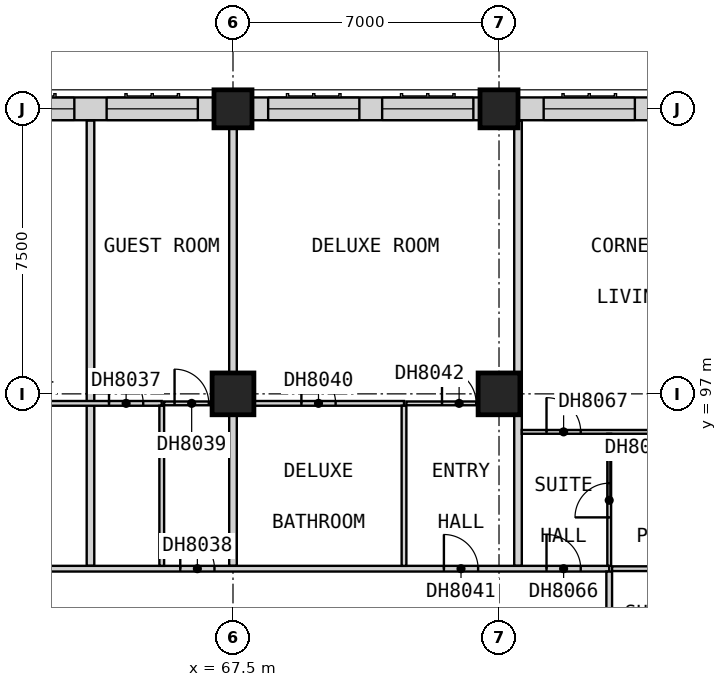
"""IFC4 building model, lengths in metres.
Left out: names, types, materials, properties, quantities, classifications, styles, units other than length and angle.
Written with IfcOpenShell. Run it as: python <this file> out.ifc"""

import sys

from ifc_helpers import new_model, si_unit, direction, frame, frame_2d, origin, origin_2d, place, context, subcontext, project, spatial, rectangle, extrude, element, fill, save


model = new_model("IFC4")
c1 = context("Model", 3, precision=1e-05, world=origin(), true_north=direction((0.0, 1.0)))
c2 = subcontext(c1, "Body", "Model", "MODEL_VIEW")
j1 = project(units=[si_unit("LENGTHUNIT", "METRE"), si_unit("PLANEANGLEUNIT", "RADIAN")], contexts=[c1])
p1 = place(None, origin())
s1 = spatial("IfcSite", under=j1, at=p1, CompositionType="ELEMENT")
p2 = place(p1, origin())
s2 = spatial("IfcBuilding", under=s1, at=p2, CompositionType="ELEMENT")
p3 = place(p2, frame((0.0, 0.0, 89.9)))
s3 = spatial("IfcBuildingStorey", under=s2, at=p3, CompositionType="ELEMENT", Elevation=89.9)
p4 = place(p3, frame((67.5, 97.0, 0.0), z_axis=(0.0, 0.0, 1.0), x_axis=(1.0, 0.0, 0.0)))
e1 = element("IfcColumn", 1, at=p4, inside=s3, PredefinedType="COLUMN", context=c2, shape_type="SweptSolid", body=[
    extrude(rectangle(XDim=1.1, YDim=1.1, at=origin_2d()), origin(), (0.0, 0.0, 1.0), 3.6),
])
p5 = place(p3, frame((67.5, 104.5, 0.0), z_axis=(0.0, 0.0, 1.0), x_axis=(1.0, 0.0, 0.0)))
e2 = element("IfcColumn", 2, at=p5, inside=s3, PredefinedType="COLUMN", context=c2, shape_type="SweptSolid", body=[
    extrude(rectangle(XDim=1.0, YDim=1.0, at=origin_2d()), origin(), (0.0, 0.0, 1.0), 3.6),
])
p6 = place(p3, frame((74.5, 97.0, 0.0), z_axis=(0.0, 0.0, 1.0), x_axis=(1.0, 0.0, 0.0)))
e3 = element("IfcColumn", 3, at=p6, inside=s3, PredefinedType="COLUMN", context=c2, shape_type="SweptSolid", body=[
    extrude(rectangle(XDim=1.1, YDim=1.1, at=origin_2d()), origin(), (0.0, 0.0, 1.0), 3.6),
])
p7 = place(p3, frame((74.5, 104.5, 0.0), z_axis=(0.0, 0.0, 1.0), x_axis=(1.0, 0.0, 0.0)))
e4 = element("IfcColumn", 4, at=p7, inside=s3, PredefinedType="COLUMN", context=c2, shape_type="SweptSolid", body=[
    extrude(rectangle(XDim=1.0, YDim=1.0, at=origin_2d()), origin(), (0.0, 0.0, 1.0), 3.6),
])
p8 = place(p3, frame((81.5, 104.5, 0.0), z_axis=(0.0, 0.0, 1.0), x_axis=(-1.0, 0.0, 0.0)))
e5 = element("IfcWall", 5, at=p8, inside=s3, PredefinedType="SOLIDWALL", context=c2, shape_type="SweptSolid", body=[
    extrude(rectangle(XDim=6.5, YDim=0.6, at=frame_2d((3.25, 0.0))), origin(), (0.0, 0.0, 1.0), 2.85),
])
p9 = place(p8, frame((3.425, 0.0, 0.8)))
e6 = element("IfcOpeningElement", 6, at=p9, cuts=e5, PredefinedType="OPENING", context=c2, shape_type="SweptSolid", body=[
    extrude(rectangle(XDim=2.4, YDim=1.8, at=frame_2d((1.2, 0.9))), frame((0.0, 0.31, 0.0), z_axis=(0.0, -1.0, 0.0), x_axis=(1.0, 0.0, 0.0)), (0.0, 0.0, 1.0), 0.62),
])
p10 = place(p8, frame((0.175, 0.0, 0.8)))
e7 = element("IfcOpeningElement", 7, at=p10, cuts=e5, PredefinedType="OPENING", context=c2, shape_type="SweptSolid", body=[
    extrude(rectangle(XDim=2.4, YDim=1.8, at=frame_2d((1.2, 0.9))), frame((0.0, 0.31, 0.0), z_axis=(0.0, -1.0, 0.0), x_axis=(1.0, 0.0, 0.0)), (0.0, 0.0, 1.0), 0.62),
])
p11 = place(p3, frame((74.0, 104.5, 0.0), z_axis=(0.0, 0.0, 1.0), x_axis=(-1.0, 0.0, 0.0)))
e8 = element("IfcWall", 8, at=p11, inside=s3, PredefinedType="SOLIDWALL", context=c2, shape_type="SweptSolid", body=[
    extrude(rectangle(XDim=6.0, YDim=0.6, at=frame_2d((3.0, 0.0))), origin(), (0.0, 0.0, 1.0), 2.85),
])
p12 = place(p11, frame((3.175, 0.0, 0.8)))
e9 = element("IfcOpeningElement", 9, at=p12, cuts=e8, PredefinedType="OPENING", context=c2, shape_type="SweptSolid", body=[
    extrude(rectangle(XDim=2.4, YDim=1.8, at=frame_2d((1.2, 0.9))), frame((0.0, 0.31, 0.0), z_axis=(0.0, -1.0, 0.0), x_axis=(1.0, 0.0, 0.0)), (0.0, 0.0, 1.0), 0.62),
])
p13 = place(p11, frame((0.175, 0.0, 0.8)))
e10 = element("IfcOpeningElement", 10, at=p13, cuts=e8, PredefinedType="OPENING", context=c2, shape_type="SweptSolid", body=[
    extrude(rectangle(XDim=2.4, YDim=1.8, at=frame_2d((1.2, 0.9))), frame((0.0, 0.31, 0.0), z_axis=(0.0, -1.0, 0.0), x_axis=(1.0, 0.0, 0.0)), (0.0, 0.0, 1.0), 0.62),
])
p14 = place(p3, frame((67.0, 104.5, 0.0), z_axis=(0.0, 0.0, 1.0), x_axis=(-1.0, 0.0, 0.0)))
e11 = element("IfcWall", 11, at=p14, inside=s3, PredefinedType="SOLIDWALL", context=c2, shape_type="SweptSolid", body=[
    extrude(rectangle(XDim=6.5, YDim=0.6, at=frame_2d((3.25, 0.0))), origin(), (0.0, 0.0, 1.0), 2.85),
])
p15 = place(p14, frame((3.675, 0.0, 0.8)))
e12 = element("IfcOpeningElement", 12, at=p15, cuts=e11, PredefinedType="OPENING", context=c2, shape_type="SweptSolid", body=[
    extrude(rectangle(XDim=2.4, YDim=1.8, at=frame_2d((1.2, 0.9))), frame((0.0, 0.31, 0.0), z_axis=(0.0, -1.0, 0.0), x_axis=(1.0, 0.0, 0.0)), (0.0, 0.0, 1.0), 0.62),
])
p16 = place(p14, frame((0.425, 0.0, 0.8)))
e13 = element("IfcOpeningElement", 13, at=p16, cuts=e11, PredefinedType="OPENING", context=c2, shape_type="SweptSolid", body=[
    extrude(rectangle(XDim=2.4, YDim=1.8, at=frame_2d((1.2, 0.9))), frame((0.0, 0.31, 0.0), z_axis=(0.0, -1.0, 0.0), x_axis=(1.0, 0.0, 0.0)), (0.0, 0.0, 1.0), 0.62),
])
p17 = place(p3, frame((63.75, 92.475, 0.0), z_axis=(0.0, 0.0, 1.0), x_axis=(0.0, 1.0, 0.0)))
e14 = element("IfcWall", 14, at=p17, inside=s3, PredefinedType="PARTITIONING", context=c2, shape_type="SweptSolid", body=[
    extrude(rectangle(XDim=11.715, YDim=0.2, at=frame_2d((5.857, 0.0))), origin(), (0.0, 0.0, 1.0), 3.35),
])
p18 = place(p3, frame((67.5, 92.475, 0.0), z_axis=(0.0, 0.0, 1.0), x_axis=(0.0, 1.0, 0.0)))
e15 = element("IfcWall", 15, at=p18, inside=s3, PredefinedType="PARTITIONING", context=c2, shape_type="SweptSolid", body=[
    extrude(rectangle(XDim=12.525, YDim=0.2, at=frame_2d((6.262, 0.0))), origin(), (0.0, 0.0, 1.0), 3.35),
])
p19 = place(p3, frame((75.0, 92.475, 0.0), z_axis=(0.0, 0.0, 1.0), x_axis=(0.0, 1.0, 0.0)))
e16 = element("IfcWall", 16, at=p19, inside=s3, PredefinedType="PARTITIONING", context=c2, shape_type="SweptSolid", body=[
    extrude(rectangle(XDim=11.715, YDim=0.2, at=frame_2d((5.857, 0.0))), origin(), (0.0, 0.0, 1.0), 3.35),
])
p20 = place(p3, frame((33.75, 92.4, 0.0), z_axis=(0.0, 0.0, 1.0), x_axis=(1.0, 0.0, 0.0)))
e17 = element("IfcWall", 17, at=p20, inside=s3, PredefinedType="PARTITIONING", context=c2, shape_type="SweptSolid", body=[
    extrude(rectangle(XDim=43.65, YDim=0.15, at=frame_2d((21.825, 0.0))), origin(), (0.0, 0.0, 1.0), 3.35),
])
p21 = place(p20, frame((5.175, 0.0, 0.0)))
e18 = element("IfcOpeningElement", 18, at=p21, cuts=e17, PredefinedType="OPENING", context=c2, shape_type="SweptSolid", body=[
    extrude(rectangle(XDim=0.9, YDim=2.1, at=frame_2d((0.45, 1.05))), frame((0.0, 0.085, 0.0), z_axis=(0.0, -1.0, 0.0), x_axis=(1.0, 0.0, 0.0)), (0.0, 0.0, 1.0), 0.17),
])
p22 = place(p20, frame((13.05, 0.0, 0.0)))
e19 = element("IfcOpeningElement", 19, at=p22, cuts=e17, PredefinedType="OPENING", context=c2, shape_type="SweptSolid", body=[
    extrude(rectangle(XDim=0.9, YDim=2.1, at=frame_2d((0.45, 1.05))), frame((0.0, 0.085, 0.0), z_axis=(0.0, -1.0, 0.0), x_axis=(1.0, 0.0, 0.0)), (0.0, 0.0, 1.0), 0.17),
])
p23 = place(p20, frame((20.55, 0.0, 0.0)))
e20 = element("IfcOpeningElement", 20, at=p23, cuts=e17, PredefinedType="OPENING", context=c2, shape_type="SweptSolid", body=[
    extrude(rectangle(XDim=0.9, YDim=2.1, at=frame_2d((0.45, 1.05))), frame((0.0, 0.085, 0.0), z_axis=(0.0, -1.0, 0.0), x_axis=(1.0, 0.0, 0.0)), (0.0, 0.0, 1.0), 0.17),
])
p24 = place(p20, frame((32.363, 0.0, 0.0)))
e21 = element("IfcOpeningElement", 21, at=p24, cuts=e17, PredefinedType="OPENING", context=c2, shape_type="SweptSolid", body=[
    extrude(rectangle(XDim=0.9, YDim=2.1, at=frame_2d((0.45, 1.05))), frame((0.0, 0.085, 0.0), z_axis=(0.0, -1.0, 0.0), x_axis=(1.0, 0.0, 0.0)), (0.0, 0.0, 1.0), 0.17),
])
p25 = place(p20, frame((39.3, 0.0, 0.0)))
e22 = element("IfcOpeningElement", 22, at=p25, cuts=e17, PredefinedType="OPENING", context=c2, shape_type="SweptSolid", body=[
    extrude(rectangle(XDim=0.9, YDim=2.1, at=frame_2d((0.45, 1.05))), frame((0.0, 0.085, 0.0), z_axis=(0.0, -1.0, 0.0), x_axis=(1.0, 0.0, 0.0)), (0.0, 0.0, 1.0), 0.17),
])
p26 = place(p20, frame((42.0, 0.0, 0.0)))
e23 = element("IfcOpeningElement", 23, at=p26, cuts=e17, PredefinedType="OPENING", context=c2, shape_type="SweptSolid", body=[
    extrude(rectangle(XDim=0.9, YDim=2.1, at=frame_2d((0.45, 1.05))), frame((0.0, 0.085, 0.0), z_axis=(0.0, -1.0, 0.0), x_axis=(1.0, 0.0, 0.0)), (0.0, 0.0, 1.0), 0.17),
])
p27 = place(p3, frame((77.4, 50.175, 0.0), z_axis=(0.0, 0.0, 1.0), x_axis=(0.0, 1.0, 0.0)))
e24 = element("IfcWall", 24, at=p27, inside=s3, PredefinedType="PARTITIONING", context=c2, shape_type="SweptSolid", body=[
    extrude(rectangle(XDim=42.15, YDim=0.15, at=frame_2d((21.075, 0.0))), origin(), (0.0, 0.0, 1.0), 3.35),
])
p28 = place(p27, frame((7.875, 0.0, 0.0)))
e25 = element("IfcOpeningElement", 25, at=p28, cuts=e24, PredefinedType="OPENING", context=c2, shape_type="SweptSolid", body=[
    extrude(rectangle(XDim=0.9, YDim=2.1, at=frame_2d((0.45, 1.05))), frame((0.0, 0.085, 0.0), z_axis=(0.0, -1.0, 0.0), x_axis=(1.0, 0.0, 0.0)), (0.0, 0.0, 1.0), 0.17),
])
p29 = place(p27, frame((15.375, 0.0, 0.0)))
e26 = element("IfcOpeningElement", 26, at=p29, cuts=e24, PredefinedType="OPENING", context=c2, shape_type="SweptSolid", body=[
    extrude(rectangle(XDim=0.9, YDim=2.1, at=frame_2d((0.45, 1.05))), frame((0.0, 0.085, 0.0), z_axis=(0.0, -1.0, 0.0), x_axis=(1.0, 0.0, 0.0)), (0.0, 0.0, 1.0), 0.17),
])
p30 = place(p27, frame((30.375, 0.0, 0.0)))
e27 = element("IfcOpeningElement", 27, at=p30, cuts=e24, PredefinedType="OPENING", context=c2, shape_type="SweptSolid", body=[
    extrude(rectangle(XDim=0.9, YDim=2.1, at=frame_2d((0.45, 1.05))), frame((0.0, 0.085, 0.0), z_axis=(0.0, -1.0, 0.0), x_axis=(1.0, 0.0, 0.0)), (0.0, 0.0, 1.0), 0.17),
])
p31 = place(p3, frame((75.1, 96.0, 0.0), z_axis=(0.0, 0.0, 1.0), x_axis=(1.0, 0.0, 0.0)))
e28 = element("IfcWall", 28, at=p31, inside=s3, PredefinedType="PARTITIONING", context=c2, shape_type="SweptSolid", body=[
    extrude(rectangle(XDim=7.35, YDim=0.1, at=frame_2d((3.675, 0.0))), origin(), (0.0, 0.0, 1.0), 3.35),
])
p32 = place(p31, frame((0.65, 0.0, 0.0)))
e29 = element("IfcOpeningElement", 29, at=p32, cuts=e28, PredefinedType="OPENING", context=c2, shape_type="SweptSolid", body=[
    extrude(rectangle(XDim=0.9, YDim=2.1, at=frame_2d((0.45, 1.05))), frame((0.0, 0.06, 0.0), z_axis=(0.0, -1.0, 0.0), x_axis=(1.0, 0.0, 0.0)), (0.0, 0.0, 1.0), 0.12),
])
p33 = place(p3, frame((65.688, 96.75, 0.0), z_axis=(0.0, 0.0, 1.0), x_axis=(1.0, 0.0, 0.0)))
e30 = element("IfcWall", 30, at=p33, inside=s3, PredefinedType="PARTITIONING", context=c2, shape_type="SweptSolid", body=[
    extrude(rectangle(XDim=1.712, YDim=0.1, at=frame_2d((0.856, 0.0))), origin(), (0.0, 0.0, 1.0), 3.35),
])
p34 = place(p33, frame((0.275, 0.0, 0.0)))
e31 = element("IfcOpeningElement", 31, at=p34, cuts=e30, PredefinedType="OPENING", context=c2, shape_type="SweptSolid", body=[
    extrude(rectangle(XDim=0.9, YDim=2.1, at=frame_2d((0.45, 1.05))), frame((0.0, 0.06, 0.0), z_axis=(0.0, -1.0, 0.0), x_axis=(1.0, 0.0, 0.0)), (0.0, 0.0, 1.0), 0.12),
])
p35 = place(p3, frame((72.062, 96.75, 0.0), z_axis=(0.0, 0.0, 1.0), x_axis=(1.0, 0.0, 0.0)))
e32 = element("IfcWall", 32, at=p35, inside=s3, PredefinedType="PARTITIONING", context=c2, shape_type="SweptSolid", body=[
    extrude(rectangle(XDim=2.837, YDim=0.1, at=frame_2d((1.419, 0.0))), origin(), (0.0, 0.0, 1.0), 3.35),
])
p36 = place(p35, frame((0.938, 0.0, 0.0)))
e33 = element("IfcOpeningElement", 33, at=p36, cuts=e32, PredefinedType="OPENING", context=c2, shape_type="SweptSolid", body=[
    extrude(rectangle(XDim=0.9, YDim=2.1, at=frame_2d((0.45, 1.05))), frame((0.0, 0.06, 0.0), z_axis=(0.0, -1.0, 0.0), x_axis=(1.0, 0.0, 0.0)), (0.0, 0.0, 1.0), 0.12),
])
p37 = place(p3, frame((77.4, 92.475, 0.0), z_axis=(0.0, 0.0, 1.0), x_axis=(0.0, 1.0, 0.0)))
e34 = element("IfcWall", 34, at=p37, inside=s3, PredefinedType="PARTITIONING", context=c2, shape_type="SweptSolid", body=[
    extrude(rectangle(XDim=3.475, YDim=0.1, at=frame_2d((1.737, 0.0))), origin(), (0.0, 0.0, 1.0), 3.35),
])
p38 = place(p37, frame((1.275, 0.0, 0.0)))
e35 = element("IfcOpeningElement", 35, at=p38, cuts=e34, PredefinedType="OPENING", context=c2, shape_type="SweptSolid", body=[
    extrude(rectangle(XDim=0.9, YDim=2.1, at=frame_2d((0.45, 1.05))), frame((0.0, 0.06, 0.0), z_axis=(0.0, -1.0, 0.0), x_axis=(1.0, 0.0, 0.0)), (0.0, 0.0, 1.0), 0.12),
])
p39 = place(p3, frame((77.475, 92.4, 0.0), z_axis=(0.0, 0.0, 1.0), x_axis=(1.0, 0.0, 0.0)))
e36 = element("IfcWall", 36, at=p39, inside=s3, PredefinedType="PARTITIONING", context=c2, shape_type="SweptSolid", body=[
    extrude(rectangle(XDim=5.025, YDim=0.125, at=frame_2d((2.512, 0.0))), origin(), (0.0, 0.0, 1.0), 3.35),
])
p40 = place(p3, frame((57.0, 96.75, 0.0), z_axis=(0.0, 0.0, 1.0), x_axis=(1.0, 0.0, 0.0)))
e37 = element("IfcWall", 37, at=p40, inside=s3, PredefinedType="PARTITIONING", context=c2, shape_type="SweptSolid", body=[
    extrude(rectangle(XDim=8.625, YDim=0.125, at=frame_2d((4.312, 0.0))), origin(), (0.0, 0.0, 1.0), 3.35),
])
p41 = place(p40, frame((4.425, 0.0, 0.0)))
e38 = element("IfcOpeningElement", 38, at=p41, cuts=e37, PredefinedType="OPENING", context=c2, shape_type="SweptSolid", body=[
    extrude(rectangle(XDim=0.9, YDim=2.1, at=frame_2d((0.45, 1.05))), frame((0.0, 0.073, 0.0), z_axis=(0.0, -1.0, 0.0), x_axis=(1.0, 0.0, 0.0)), (0.0, 0.0, 1.0), 0.145),
])
p42 = place(p40, frame((7.238, 0.0, 0.0)))
e39 = element("IfcOpeningElement", 39, at=p42, cuts=e37, PredefinedType="OPENING", context=c2, shape_type="SweptSolid", body=[
    extrude(rectangle(XDim=0.9, YDim=2.1, at=frame_2d((0.45, 1.05))), frame((0.0, 0.073, 0.0), z_axis=(0.0, -1.0, 0.0), x_axis=(1.0, 0.0, 0.0)), (0.0, 0.0, 1.0), 0.145),
])
p43 = place(p3, frame((67.6, 96.75, 0.0), z_axis=(0.0, 0.0, 1.0), x_axis=(1.0, 0.0, 0.0)))
e40 = element("IfcWall", 40, at=p43, inside=s3, PredefinedType="PARTITIONING", context=c2, shape_type="SweptSolid", body=[
    extrude(rectangle(XDim=4.4, YDim=0.125, at=frame_2d((2.2, 0.0))), origin(), (0.0, 0.0, 1.0), 3.35),
])
p44 = place(p43, frame((1.7, 0.0, 0.0)))
e41 = element("IfcOpeningElement", 41, at=p44, cuts=e40, PredefinedType="OPENING", context=c2, shape_type="SweptSolid", body=[
    extrude(rectangle(XDim=0.9, YDim=2.1, at=frame_2d((0.45, 1.05))), frame((0.0, 0.073, 0.0), z_axis=(0.0, -1.0, 0.0), x_axis=(1.0, 0.0, 0.0)), (0.0, 0.0, 1.0), 0.145),
])
for number, where, z_axis, x_axis in (
    (42, (65.625, 92.475, 0.0), (0.0, 0.0, 1.0), (0.0, 1.0, 0.0)),
    (43, (72.0, 92.475, 0.0), (0.0, 0.0, 1.0), (0.0, 1.0, 0.0)),
):
    element("IfcWall", number, at=place(p3, frame(where, z_axis=z_axis, x_axis=x_axis)), inside=s3, PredefinedType="PARTITIONING", context=c2, shape_type="SweptSolid", body=[
        extrude(rectangle(XDim=4.212, YDim=0.125, at=frame_2d((2.106, 0.0))), origin(), (0.0, 0.0, 1.0), 3.35),
    ])
p45 = place(p9, origin())
e44 = element("IfcWindow", 44, at=p45, inside=s3, PartitioningType="SINGLE_PANEL", PredefinedType="WINDOW", context=c2, shape_type="SweptSolid", body=[
    extrude(rectangle(XDim=2.4, YDim=1.8, at=frame_2d((1.2, 0.9))), frame((0.0, -0.07, 0.0), z_axis=(0.0, -1.0, 0.0), x_axis=(1.0, 0.0, 0.0)), (0.0, 0.0, 1.0), 0.06),
])
fill(e6, e44)
p46 = place(p12, origin())
e45 = element("IfcWindow", 45, at=p46, inside=s3, PartitioningType="SINGLE_PANEL", PredefinedType="WINDOW", context=c2, shape_type="SweptSolid", body=[
    extrude(rectangle(XDim=2.4, YDim=1.8, at=frame_2d((1.2, 0.9))), frame((0.0, -0.07, 0.0), z_axis=(0.0, -1.0, 0.0), x_axis=(1.0, 0.0, 0.0)), (0.0, 0.0, 1.0), 0.06),
])
fill(e9, e45)
p47 = place(p13, origin())
e46 = element("IfcWindow", 46, at=p47, inside=s3, PartitioningType="SINGLE_PANEL", PredefinedType="WINDOW", context=c2, shape_type="SweptSolid", body=[
    extrude(rectangle(XDim=2.4, YDim=1.8, at=frame_2d((1.2, 0.9))), frame((0.0, -0.07, 0.0), z_axis=(0.0, -1.0, 0.0), x_axis=(1.0, 0.0, 0.0)), (0.0, 0.0, 1.0), 0.06),
])
fill(e10, e46)
p48 = place(p15, origin())
e47 = element("IfcWindow", 47, at=p48, inside=s3, PartitioningType="SINGLE_PANEL", PredefinedType="WINDOW", context=c2, shape_type="SweptSolid", body=[
    extrude(rectangle(XDim=2.4, YDim=1.8, at=frame_2d((1.2, 0.9))), frame((0.0, -0.07, 0.0), z_axis=(0.0, -1.0, 0.0), x_axis=(1.0, 0.0, 0.0)), (0.0, 0.0, 1.0), 0.06),
])
fill(e12, e47)
p49 = place(p16, origin())
e48 = element("IfcWindow", 48, at=p49, inside=s3, PartitioningType="SINGLE_PANEL", PredefinedType="WINDOW", context=c2, shape_type="SweptSolid", body=[
    extrude(rectangle(XDim=2.4, YDim=1.8, at=frame_2d((1.2, 0.9))), frame((0.0, -0.07, 0.0), z_axis=(0.0, -1.0, 0.0), x_axis=(1.0, 0.0, 0.0)), (0.0, 0.0, 1.0), 0.06),
])
fill(e13, e48)
p50 = place(p42, origin())
e49 = element("IfcDoor", 49, at=p50, inside=s3, OperationType="SINGLE_SWING_RIGHT", PredefinedType="DOOR", context=c2, shape_type="SweptSolid", body=[
    extrude(rectangle(XDim=0.9, YDim=2.1, at=frame_2d((0.45, 1.05))), frame((0.0, 0.025, 0.0), z_axis=(0.0, -1.0, 0.0), x_axis=(1.0, 0.0, 0.0)), (0.0, 0.0, 1.0), 0.05),
])
fill(e39, e49)
p51 = place(p24, origin())
e50 = element("IfcDoor", 50, at=p51, inside=s3, OperationType="SINGLE_SWING_LEFT", PredefinedType="DOOR", context=c2, shape_type="SweptSolid", body=[
    extrude(rectangle(XDim=0.9, YDim=2.1, at=frame_2d((0.45, 1.05))), frame((0.0, 0.025, 0.0), z_axis=(0.0, -1.0, 0.0), x_axis=(1.0, 0.0, 0.0)), (0.0, 0.0, 1.0), 0.05),
])
fill(e21, e50)
p52 = place(p34, origin())
e51 = element("IfcDoor", 51, at=p52, inside=s3, OperationType="SINGLE_SWING_RIGHT", PredefinedType="DOOR", context=c2, shape_type="SweptSolid", body=[
    extrude(rectangle(XDim=0.9, YDim=2.1, at=frame_2d((0.45, 1.05))), frame((0.0, 0.025, 0.0), z_axis=(0.0, -1.0, 0.0), x_axis=(1.0, 0.0, 0.0)), (0.0, 0.0, 1.0), 0.05),
])
fill(e31, e51)
p53 = place(p44, origin())
e52 = element("IfcDoor", 52, at=p53, inside=s3, OperationType="SINGLE_SWING_RIGHT", PredefinedType="DOOR", context=c2, shape_type="SweptSolid", body=[
    extrude(rectangle(XDim=0.9, YDim=2.1, at=frame_2d((0.45, 1.05))), frame((0.0, 0.025, 0.0), z_axis=(0.0, -1.0, 0.0), x_axis=(1.0, 0.0, 0.0)), (0.0, 0.0, 1.0), 0.05),
])
fill(e41, e52)
p54 = place(p25, origin())
e53 = element("IfcDoor", 53, at=p54, inside=s3, OperationType="SINGLE_SWING_LEFT", PredefinedType="DOOR", context=c2, shape_type="SweptSolid", body=[
    extrude(rectangle(XDim=0.9, YDim=2.1, at=frame_2d((0.45, 1.05))), frame((0.0, 0.025, 0.0), z_axis=(0.0, -1.0, 0.0), x_axis=(1.0, 0.0, 0.0)), (0.0, 0.0, 1.0), 0.05),
])
fill(e22, e53)
p55 = place(p36, origin())
e54 = element("IfcDoor", 54, at=p55, inside=s3, OperationType="SINGLE_SWING_RIGHT", PredefinedType="DOOR", context=c2, shape_type="SweptSolid", body=[
    extrude(rectangle(XDim=0.9, YDim=2.1, at=frame_2d((0.45, 1.05))), frame((0.0, 0.025, 0.0), z_axis=(0.0, -1.0, 0.0), x_axis=(1.0, 0.0, 0.0)), (0.0, 0.0, 1.0), 0.05),
])
fill(e33, e54)
p56 = place(p26, origin())
e55 = element("IfcDoor", 55, at=p56, inside=s3, OperationType="SINGLE_SWING_RIGHT", PredefinedType="DOOR", context=c2, shape_type="SweptSolid", body=[
    extrude(rectangle(XDim=0.9, YDim=2.1, at=frame_2d((0.45, 1.05))), frame((0.0, 0.025, 0.0), z_axis=(0.0, -1.0, 0.0), x_axis=(1.0, 0.0, 0.0)), (0.0, 0.0, 1.0), 0.05),
])
fill(e23, e55)
p57 = place(p32, origin())
e56 = element("IfcDoor", 56, at=p57, inside=s3, OperationType="SINGLE_SWING_LEFT", PredefinedType="DOOR", context=c2, shape_type="SweptSolid", body=[
    extrude(rectangle(XDim=0.9, YDim=2.1, at=frame_2d((0.45, 1.05))), frame((0.0, 0.025, 0.0), z_axis=(0.0, -1.0, 0.0), x_axis=(1.0, 0.0, 0.0)), (0.0, 0.0, 1.0), 0.05),
])
fill(e29, e56)
p58 = place(p38, origin())
e57 = element("IfcDoor", 57, at=p58, inside=s3, OperationType="SINGLE_SWING_RIGHT", PredefinedType="DOOR", context=c2, shape_type="SweptSolid", body=[
    extrude(rectangle(XDim=0.9, YDim=2.1, at=frame_2d((0.45, 1.05))), frame((0.0, 0.025, 0.0), z_axis=(0.0, -1.0, 0.0), x_axis=(1.0, 0.0, 0.0)), (0.0, 0.0, 1.0), 0.05),
])
fill(e35, e57)
save(model, sys.argv[1])
